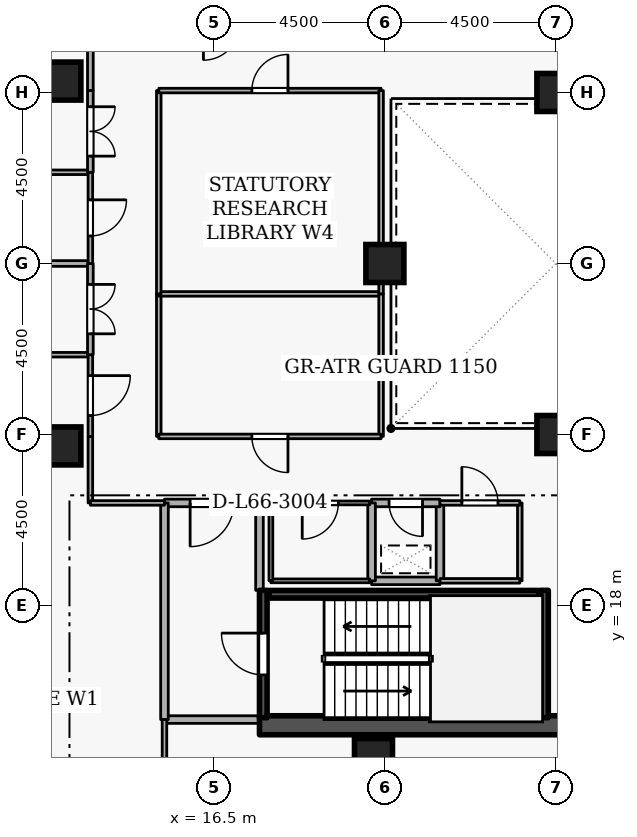
"""IFC4 building model, lengths in metres.
Left out: names, types, materials, properties, quantities, classifications, styles, units other than length and angle.
Written with IfcOpenShell. Run it as: python <this file> out.ifc"""

import sys

from ifc_helpers import new_model, si_unit, direction, frame, frame_2d, origin, origin_2d, place, context, subcontext, project, spatial, rectangle, extrude, element, fill, save


model = new_model("IFC4")
c1 = context("Model", 3, precision=1e-05, world=origin(), true_north=direction((0.0, 1.0)))
c2 = subcontext(c1, "Body", "Model", "MODEL_VIEW")
j1 = project(units=[si_unit("LENGTHUNIT", "METRE"), si_unit("PLANEANGLEUNIT", "RADIAN")], contexts=[c1])
p1 = place(None, origin())
s1 = spatial("IfcSite", under=j1, at=p1, CompositionType="ELEMENT")
p2 = place(p1, origin())
s2 = spatial("IfcBuilding", under=s1, at=p2, CompositionType="ELEMENT")
p3 = place(p2, frame((0.0, 0.0, 247.5)))
s3 = spatial("IfcBuildingStorey", under=s2, at=p3, CompositionType="ELEMENT", Elevation=247.5)
p4 = place(p3, frame((17.7, 14.85, 0.0), z_axis=(0.0, 0.0, 1.0), x_axis=(1.0, 0.0, 0.0)))
e1 = element("IfcWall", 1, at=p4, inside=s3, PredefinedType="SHEAR", context=c2, shape_type="SweptSolid", body=[
    extrude(rectangle(XDim=15.6, YDim=0.5, at=frame_2d((7.8, 0.0))), origin(), (0.0, 0.0, 1.0), 3.6),
])
for number, where, z_axis, x_axis in (
    (2, (12.5, 22.2, 0.0), (0.0, 0.0, 1.0), (1.0, 0.0, 0.0)),
    (3, (12.5, 31.8, 0.0), (0.0, 0.0, 1.0), (1.0, 0.0, 0.0)),
    (4, (20.7, 14.0, 0.0), (0.0, 0.0, 1.0), (1.0, 0.0, 0.0)),
    (5, (25.5, 22.5, 0.0), (0.0, 0.0, 1.0), (1.0, 0.0, 0.0)),
    (6, (25.5, 31.5, 0.0), (0.0, 0.0, 1.0), (1.0, 0.0, 0.0)),
    (7, (21.0, 27.0, 0.0), (0.0, 0.0, 1.0), (1.0, 0.0, 0.0)),
):
    element("IfcColumn", number, at=place(p3, frame(where, z_axis=z_axis, x_axis=x_axis)), inside=s3, PredefinedType="COLUMN", context=c2, shape_type="SweptSolid", body=[
        extrude(rectangle(XDim=1.0, YDim=1.0, at=origin_2d()), origin(), (0.0, 0.0, 1.0), 3.6),
    ])
p5 = place(p3, frame((17.8, 15.05, 0.0), z_axis=(0.0, 0.0, 1.0), x_axis=(0.0, 1.0, 0.0)))
e8 = element("IfcWall", 8, at=p5, inside=s3, PredefinedType="SHEAR", context=c2, shape_type="SweptSolid", body=[
    extrude(rectangle(XDim=3.35, YDim=0.2, at=frame_2d((1.675, 0.0))), origin(), (0.0, 0.0, 1.0), 3.6),
])
p6 = place(p5, frame((1.125, 0.0, 0.0)))
e9 = element("IfcOpeningElement", 9, at=p6, cuts=e8, PredefinedType="OPENING", context=c2, shape_type="SweptSolid", body=[
    extrude(rectangle(XDim=1.1, YDim=2.1, at=frame_2d((0.55, 1.05))), frame((0.0, 0.11, 0.0), z_axis=(0.0, -1.0, 0.0), x_axis=(1.0, 0.0, 0.0)), (0.0, 0.0, 1.0), 0.22),
])
p7 = place(p3, frame((25.2, 18.4, 0.0), z_axis=(0.0, 0.0, 1.0), x_axis=(0.0, -1.0, 0.0)))
e10 = element("IfcWall", 10, at=p7, inside=s3, PredefinedType="SHEAR", context=c2, shape_type="SweptSolid", body=[
    extrude(rectangle(XDim=3.35, YDim=0.2, at=frame_2d((1.675, 0.0))), origin(), (0.0, 0.0, 1.0), 3.6),
])
p8 = place(p3, frame((25.05, 18.297, 0.0), z_axis=(0.0, 0.0, 1.0), x_axis=(-1.0, 0.0, 0.0)))
e11 = element("IfcWall", 11, at=p8, inside=s3, PredefinedType="SHEAR", context=c2, shape_type="SweptSolid", body=[
    extrude(rectangle(XDim=7.1, YDim=0.2, at=frame_2d((3.55, 0.0))), origin(), (0.0, 0.0, 1.0), 3.6),
])
p9 = place(p3, frame((15.2, 15.0, 0.0), z_axis=(0.0, 0.0, 1.0), x_axis=(1.0, 0.0, 0.0)))
e12 = element("IfcWall", 12, at=p9, inside=s3, PredefinedType="STANDARD", context=c2, shape_type="SweptSolid", body=[
    extrude(rectangle(XDim=2.5, YDim=0.2, at=frame_2d((1.25, 0.0))), origin(), (0.0, 0.0, 1.0), 3.34),
])
p10 = place(p3, frame((17.7, 18.4, 0.0), z_axis=(0.0, 0.0, 1.0), x_axis=(0.0, 1.0, 0.0)))
e13 = element("IfcWall", 13, at=p10, inside=s3, PredefinedType="STANDARD", context=c2, shape_type="SweptSolid", body=[
    extrude(rectangle(XDim=2.3, YDim=0.2, at=frame_2d((1.15, 0.0))), origin(), (0.0, 0.0, 1.0), 2.545),
])
p11 = place(p3, frame((17.7, 20.7, 0.0), z_axis=(0.0, 0.0, 1.0), x_axis=(-1.0, 0.0, 0.0)))
e14 = element("IfcWall", 14, at=p11, inside=s3, PredefinedType="STANDARD", context=c2, shape_type="SweptSolid", body=[
    extrude(rectangle(XDim=2.5, YDim=0.2, at=frame_2d((1.25, 0.0))), origin(), (0.0, 0.0, 1.0), 3.34),
])
p12 = place(p11, frame((0.675, 0.0, 0.0)))
e15 = element("IfcOpeningElement", 15, at=p12, cuts=e14, PredefinedType="OPENING", context=c2, shape_type="SweptSolid", body=[
    extrude(rectangle(XDim=1.15, YDim=2.1, at=frame_2d((0.575, 1.05))), frame((0.0, 0.11, 0.0), z_axis=(0.0, -1.0, 0.0), x_axis=(1.0, 0.0, 0.0)), (0.0, 0.0, 1.0), 0.22),
])
p13 = place(p3, frame((15.2, 20.7, 0.0), z_axis=(0.0, 0.0, 1.0), x_axis=(0.0, -1.0, 0.0)))
e16 = element("IfcWall", 16, at=p13, inside=s3, PredefinedType="STANDARD", context=c2, shape_type="SweptSolid", body=[
    extrude(rectangle(XDim=5.7, YDim=0.2, at=frame_2d((2.85, 0.0))), origin(), (0.0, 0.0, 1.0), 3.34),
])
p14 = place(p3, frame((20.65, 18.65, 0.0), z_axis=(0.0, 0.0, 1.0), x_axis=(1.0, 0.0, 0.0)))
e17 = element("IfcWall", 17, at=p14, inside=s3, PredefinedType="STANDARD", context=c2, shape_type="SweptSolid", body=[
    extrude(rectangle(XDim=1.8, YDim=0.2, at=frame_2d((0.9, 0.0))), origin(), (0.0, 0.0, 1.0), 3.34),
])
p15 = place(p3, frame((22.45, 18.65, 0.0), z_axis=(0.0, 0.0, 1.0), x_axis=(0.0, 1.0, 0.0)))
e18 = element("IfcWall", 18, at=p15, inside=s3, PredefinedType="STANDARD", context=c2, shape_type="SweptSolid", body=[
    extrude(rectangle(XDim=2.05, YDim=0.2, at=frame_2d((1.025, 0.0))), origin(), (0.0, 0.0, 1.0), 3.34),
])
p16 = place(p3, frame((22.45, 20.7, 0.0), z_axis=(0.0, 0.0, 1.0), x_axis=(-1.0, 0.0, 0.0)))
e19 = element("IfcWall", 19, at=p16, inside=s3, PredefinedType="STANDARD", context=c2, shape_type="SweptSolid", body=[
    extrude(rectangle(XDim=1.8, YDim=0.2, at=frame_2d((0.9, 0.0))), origin(), (0.0, 0.0, 1.0), 3.34),
])
p17 = place(p16, frame((0.46, 0.0, 0.0)))
e20 = element("IfcOpeningElement", 20, at=p17, cuts=e19, PredefinedType="OPENING", context=c2, shape_type="SweptSolid", body=[
    extrude(rectangle(XDim=0.88, YDim=2.04, at=frame_2d((0.44, 1.02))), frame((0.0, 0.11, 0.0), z_axis=(0.0, -1.0, 0.0), x_axis=(1.0, 0.0, 0.0)), (0.0, 0.0, 1.0), 0.22),
])
p18 = place(p3, frame((20.65, 20.7, 0.0), z_axis=(0.0, 0.0, 1.0), x_axis=(0.0, -1.0, 0.0)))
e21 = element("IfcWall", 21, at=p18, inside=s3, PredefinedType="STANDARD", context=c2, shape_type="SweptSolid", body=[
    extrude(rectangle(XDim=2.05, YDim=0.2, at=frame_2d((1.025, 0.0))), origin(), (0.0, 0.0, 1.0), 3.34),
])
p19 = place(p3, frame((18.0, 18.65, 0.0), z_axis=(0.0, 0.0, 1.0), x_axis=(1.0, 0.0, 0.0)))
e22 = element("IfcWall", 22, at=p19, inside=s3, PredefinedType="PARTITIONING", context=c2, shape_type="SweptSolid", body=[
    extrude(rectangle(XDim=2.6, YDim=0.1, at=frame_2d((1.3, 0.0))), origin(), (0.0, 0.0, 1.0), 3.34),
])
p20 = place(p3, frame((20.6, 20.7, 0.0), z_axis=(0.0, 0.0, 1.0), x_axis=(-1.0, 0.0, 0.0)))
e23 = element("IfcWall", 23, at=p20, inside=s3, PredefinedType="PARTITIONING", context=c2, shape_type="SweptSolid", body=[
    extrude(rectangle(XDim=2.6, YDim=0.1, at=frame_2d((1.3, 0.0))), origin(), (0.0, 0.0, 1.0), 3.34),
])
p21 = place(p20, frame((0.825, 0.0, 0.0)))
e24 = element("IfcOpeningElement", 24, at=p21, cuts=e23, PredefinedType="OPENING", context=c2, shape_type="SweptSolid", body=[
    extrude(rectangle(XDim=0.95, YDim=2.1, at=frame_2d((0.475, 1.05))), frame((0.0, 0.06, 0.0), z_axis=(0.0, -1.0, 0.0), x_axis=(1.0, 0.0, 0.0)), (0.0, 0.0, 1.0), 0.12),
])
p22 = place(p3, frame((18.0, 20.7, 0.0), z_axis=(0.0, 0.0, 1.0), x_axis=(0.0, -1.0, 0.0)))
e25 = element("IfcWall", 25, at=p22, inside=s3, PredefinedType="PARTITIONING", context=c2, shape_type="SweptSolid", body=[
    extrude(rectangle(XDim=2.05, YDim=0.1, at=frame_2d((1.025, 0.0))), origin(), (0.0, 0.0, 1.0), 2.545),
])
p23 = place(p3, frame((24.55, 20.7, 0.0), z_axis=(0.0, 0.0, 1.0), x_axis=(0.0, -1.0, 0.0)))
e26 = element("IfcWall", 26, at=p23, inside=s3, PredefinedType="PARTITIONING", context=c2, shape_type="SweptSolid", body=[
    extrude(rectangle(XDim=2.05, YDim=0.12, at=frame_2d((1.025, 0.0))), origin(), (0.0, 0.0, 1.0), 3.34),
])
p24 = place(p3, frame((24.55, 18.65, 0.0), z_axis=(0.0, 0.0, 1.0), x_axis=(-1.0, 0.0, 0.0)))
e27 = element("IfcWall", 27, at=p24, inside=s3, PredefinedType="PARTITIONING", context=c2, shape_type="SweptSolid", body=[
    extrude(rectangle(XDim=2.1, YDim=0.12, at=frame_2d((1.05, 0.0))), origin(), (0.0, 0.0, 1.0), 3.34),
])
p25 = place(p3, frame((22.45, 20.7, 0.0), z_axis=(0.0, 0.0, 1.0), x_axis=(1.0, 0.0, 0.0)))
e28 = element("IfcWall", 28, at=p25, inside=s3, PredefinedType="PARTITIONING", context=c2, shape_type="SweptSolid", body=[
    extrude(rectangle(XDim=2.1, YDim=0.12, at=frame_2d((1.05, 0.0))), origin(), (0.0, 0.0, 1.0), 3.34),
])
p26 = place(p25, frame((0.575, 0.0, 0.0)))
e29 = element("IfcOpeningElement", 29, at=p26, cuts=e28, PredefinedType="OPENING", context=c2, shape_type="SweptSolid", body=[
    extrude(rectangle(XDim=0.95, YDim=2.1, at=frame_2d((0.475, 1.05))), frame((0.0, 0.07, 0.0), z_axis=(0.0, -1.0, 0.0), x_axis=(1.0, 0.0, 0.0)), (0.0, 0.0, 1.0), 0.14),
])
p27 = place(p3, frame((13.25, 22.45, 0.0), z_axis=(0.0, 0.0, 1.0), x_axis=(0.0, -1.0, 0.0)))
e30 = element("IfcWall", 30, at=p27, inside=s3, PredefinedType="PARTITIONING", context=c2, shape_type="SweptSolid", body=[
    extrude(rectangle(XDim=1.75, YDim=0.12, at=frame_2d((0.875, 0.0))), origin(), (0.0, 0.0, 1.0), 3.34),
])
p28 = place(p3, frame((13.25, 20.7, 0.0), z_axis=(0.0, 0.0, 1.0), x_axis=(1.0, 0.0, 0.0)))
e31 = element("IfcWall", 31, at=p28, inside=s3, PredefinedType="PARTITIONING", context=c2, shape_type="SweptSolid", body=[
    extrude(rectangle(XDim=1.95, YDim=0.12, at=frame_2d((0.975, 0.0))), origin(), (0.0, 0.0, 1.0), 3.34),
])
p29 = place(p3, frame((15.2, 15.0, 0.0), z_axis=(0.0, 0.0, 1.0), x_axis=(0.0, -1.0, 0.0)))
e32 = element("IfcWall", 32, at=p29, inside=s3, PredefinedType="PARTITIONING", context=c2, shape_type="SweptSolid", body=[
    extrude(rectangle(XDim=11.72, YDim=0.12, at=frame_2d((5.86, 0.0))), origin(), (0.0, 0.0, 1.0), 3.34),
])
p30 = place(p3, frame((1.78, 24.6, 0.0), z_axis=(0.0, 0.0, 1.0), x_axis=(1.0, 0.0, 0.0)))
e33 = element("IfcWall", 33, at=p30, inside=s3, PredefinedType="PARTITIONING", context=c2, shape_type="SweptSolid", body=[
    extrude(rectangle(XDim=11.47, YDim=0.12, at=frame_2d((5.735, 0.0))), origin(), (0.0, 0.0, 1.0), 3.34),
])
p31 = place(p3, frame((13.25, 24.6, 0.0), z_axis=(0.0, 0.0, 1.0), x_axis=(0.0, -1.0, 0.0)))
e34 = element("IfcWall", 34, at=p31, inside=s3, PredefinedType="PARTITIONING", context=c2, shape_type="SweptSolid", body=[
    extrude(rectangle(XDim=2.15, YDim=0.12, at=frame_2d((1.075, 0.0))), origin(), (0.0, 0.0, 1.0), 3.34),
])
p32 = place(p31, frame((0.55, 0.0, 0.0)))
e35 = element("IfcOpeningElement", 35, at=p32, cuts=e34, PredefinedType="OPENING", context=c2, shape_type="SweptSolid", body=[
    extrude(rectangle(XDim=1.05, YDim=2.1, at=frame_2d((0.525, 1.05))), frame((0.0, 0.07, 0.0), z_axis=(0.0, -1.0, 0.0), x_axis=(1.0, 0.0, 0.0)), (0.0, 0.0, 1.0), 0.14),
])
p33 = place(p3, frame((1.78, 27.0, 0.0), z_axis=(0.0, 0.0, 1.0), x_axis=(1.0, 0.0, 0.0)))
e36 = element("IfcWall", 36, at=p33, inside=s3, PredefinedType="PARTITIONING", context=c2, shape_type="SweptSolid", body=[
    extrude(rectangle(XDim=11.47, YDim=0.15, at=frame_2d((5.735, 0.0))), origin(), (0.0, 0.0, 1.0), 2.882),
])
p34 = place(p3, frame((13.25, 27.0, 0.0), z_axis=(0.0, 0.0, 1.0), x_axis=(0.0, -1.0, 0.0)))
e37 = element("IfcWall", 37, at=p34, inside=s3, PredefinedType="PARTITIONING", context=c2, shape_type="SweptSolid", body=[
    extrude(rectangle(XDim=2.4, YDim=0.15, at=frame_2d((1.2, 0.0))), origin(), (0.0, 0.0, 1.0), 3.34),
])
p35 = place(p34, frame((0.55, 0.0, 0.0)))
e38 = element("IfcOpeningElement", 38, at=p35, cuts=e37, PredefinedType="OPENING", context=c2, shape_type="SweptSolid", body=[
    extrude(rectangle(XDim=1.3, YDim=2.12, at=frame_2d((0.65, 1.06))), frame((0.0, 0.085, 0.0), z_axis=(0.0, -1.0, 0.0), x_axis=(1.0, 0.0, 0.0)), (0.0, 0.0, 1.0), 0.17),
])
p36 = place(p3, frame((1.78, 29.4, 0.0), z_axis=(0.0, 0.0, 1.0), x_axis=(1.0, 0.0, 0.0)))
e39 = element("IfcWall", 39, at=p36, inside=s3, PredefinedType="PARTITIONING", context=c2, shape_type="SweptSolid", body=[
    extrude(rectangle(XDim=11.47, YDim=0.12, at=frame_2d((5.735, 0.0))), origin(), (0.0, 0.0, 1.0), 3.34),
])
p37 = place(p3, frame((13.25, 29.4, 0.0), z_axis=(0.0, 0.0, 1.0), x_axis=(0.0, -1.0, 0.0)))
e40 = element("IfcWall", 40, at=p37, inside=s3, PredefinedType="PARTITIONING", context=c2, shape_type="SweptSolid", body=[
    extrude(rectangle(XDim=2.4, YDim=0.12, at=frame_2d((1.2, 0.0))), origin(), (0.0, 0.0, 1.0), 3.34),
])
p38 = place(p37, frame((0.725, 0.0, 0.0)))
e41 = element("IfcOpeningElement", 41, at=p38, cuts=e40, PredefinedType="OPENING", context=c2, shape_type="SweptSolid", body=[
    extrude(rectangle(XDim=0.95, YDim=2.1, at=frame_2d((0.475, 1.05))), frame((0.0, 0.07, 0.0), z_axis=(0.0, -1.0, 0.0), x_axis=(1.0, 0.0, 0.0)), (0.0, 0.0, 1.0), 0.14),
])
p39 = place(p3, frame((13.25, 33.3, 0.0), z_axis=(0.0, 0.0, 1.0), x_axis=(0.0, -1.0, 0.0)))
e42 = element("IfcWall", 42, at=p39, inside=s3, PredefinedType="PARTITIONING", context=c2, shape_type="SweptSolid", body=[
    extrude(rectangle(XDim=1.75, YDim=0.15, at=frame_2d((0.875, 0.0))), origin(), (0.0, 0.0, 1.0), 3.34),
])
p40 = place(p3, frame((13.25, 31.55, 0.0), z_axis=(0.0, 0.0, 1.0), x_axis=(0.0, -1.0, 0.0)))
e43 = element("IfcWall", 43, at=p40, inside=s3, PredefinedType="PARTITIONING", context=c2, shape_type="SweptSolid", body=[
    extrude(rectangle(XDim=2.15, YDim=0.15, at=frame_2d((1.075, 0.0))), origin(), (0.0, 0.0, 1.0), 3.34),
])
p41 = place(p40, frame((0.425, 0.0, 0.0)))
e44 = element("IfcOpeningElement", 44, at=p41, cuts=e43, PredefinedType="OPENING", context=c2, shape_type="SweptSolid", body=[
    extrude(rectangle(XDim=1.3, YDim=2.12, at=frame_2d((0.65, 1.06))), frame((0.0, 0.085, 0.0), z_axis=(0.0, -1.0, 0.0), x_axis=(1.0, 0.0, 0.0)), (0.0, 0.0, 1.0), 0.17),
])
p42 = place(p3, frame((15.05, 22.45, 0.0), z_axis=(0.0, 0.0, 1.0), x_axis=(0.0, 1.0, 0.0)))
e45 = element("IfcWall", 45, at=p42, inside=s3, PredefinedType="PARTITIONING", context=c2, shape_type="SweptSolid", body=[
    extrude(rectangle(XDim=3.75, YDim=0.12, at=frame_2d((1.875, 0.0))), origin(), (0.0, 0.0, 1.0), 3.34),
])
p43 = place(p3, frame((15.05, 26.2, 0.0), z_axis=(0.0, 0.0, 1.0), x_axis=(1.0, 0.0, 0.0)))
e46 = element("IfcWall", 46, at=p43, inside=s3, PredefinedType="PARTITIONING", context=c2, shape_type="SweptSolid", body=[
    extrude(rectangle(XDim=5.85, YDim=0.12, at=frame_2d((2.925, 0.0))), origin(), (0.0, 0.0, 1.0), 3.34),
])
p44 = place(p3, frame((20.9, 26.2, 0.0), z_axis=(0.0, 0.0, 1.0), x_axis=(0.0, -1.0, 0.0)))
e47 = element("IfcWall", 47, at=p44, inside=s3, PredefinedType="PARTITIONING", context=c2, shape_type="SweptSolid", body=[
    extrude(rectangle(XDim=3.75, YDim=0.12, at=frame_2d((1.875, 0.0))), origin(), (0.0, 0.0, 1.0), 3.34),
])
p45 = place(p3, frame((20.9, 22.45, 0.0), z_axis=(0.0, 0.0, 1.0), x_axis=(-1.0, 0.0, 0.0)))
e48 = element("IfcWall", 48, at=p45, inside=s3, PredefinedType="PARTITIONING", context=c2, shape_type="SweptSolid", body=[
    extrude(rectangle(XDim=5.85, YDim=0.12, at=frame_2d((2.925, 0.0))), origin(), (0.0, 0.0, 1.0), 3.34),
])
p46 = place(p45, frame((2.45, 0.0, 0.0)))
e49 = element("IfcOpeningElement", 49, at=p46, cuts=e48, PredefinedType="OPENING", context=c2, shape_type="SweptSolid", body=[
    extrude(rectangle(XDim=0.95, YDim=2.1, at=frame_2d((0.475, 1.05))), frame((0.0, 0.07, 0.0), z_axis=(0.0, -1.0, 0.0), x_axis=(1.0, 0.0, 0.0)), (0.0, 0.0, 1.0), 0.14),
])
p47 = place(p3, frame((15.05, 26.2, 0.0), z_axis=(0.0, 0.0, 1.0), x_axis=(0.0, 1.0, 0.0)))
e50 = element("IfcWall", 50, at=p47, inside=s3, PredefinedType="PARTITIONING", context=c2, shape_type="SweptSolid", body=[
    extrude(rectangle(XDim=5.35, YDim=0.12, at=frame_2d((2.675, 0.0))), origin(), (0.0, 0.0, 1.0), 3.34),
])
p48 = place(p3, frame((15.05, 31.55, 0.0), z_axis=(0.0, 0.0, 1.0), x_axis=(1.0, 0.0, 0.0)))
e51 = element("IfcWall", 51, at=p48, inside=s3, PredefinedType="PARTITIONING", context=c2, shape_type="SweptSolid", body=[
    extrude(rectangle(XDim=5.85, YDim=0.12, at=frame_2d((2.925, 0.0))), origin(), (0.0, 0.0, 1.0), 3.34),
])
p49 = place(p48, frame((2.45, 0.0, 0.0)))
e52 = element("IfcOpeningElement", 52, at=p49, cuts=e51, PredefinedType="OPENING", context=c2, shape_type="SweptSolid", body=[
    extrude(rectangle(XDim=0.95, YDim=2.1, at=frame_2d((0.475, 1.05))), frame((0.0, 0.07, 0.0), z_axis=(0.0, -1.0, 0.0), x_axis=(1.0, 0.0, 0.0)), (0.0, 0.0, 1.0), 0.14),
])
p50 = place(p3, frame((20.9, 31.55, 0.0), z_axis=(0.0, 0.0, 1.0), x_axis=(0.0, -1.0, 0.0)))
e53 = element("IfcWall", 53, at=p50, inside=s3, PredefinedType="PARTITIONING", context=c2, shape_type="SweptSolid", body=[
    extrude(rectangle(XDim=5.35, YDim=0.12, at=frame_2d((2.675, 0.0))), origin(), (0.0, 0.0, 1.0), 3.34),
])
p51 = place(p6, origin())
e54 = element("IfcDoor", 54, at=p51, inside=s3, OperationType="SINGLE_SWING_RIGHT", PredefinedType="DOOR", context=c2, shape_type="SweptSolid", body=[
    extrude(rectangle(XDim=1.1, YDim=2.1, at=frame_2d((0.55, 1.05))), frame((0.0, 0.025, 0.0), z_axis=(0.0, -1.0, 0.0), x_axis=(1.0, 0.0, 0.0)), (0.0, 0.0, 1.0), 0.05),
])
fill(e9, e54)
p52 = place(p12, origin())
e55 = element("IfcDoor", 55, at=p52, inside=s3, OperationType="SINGLE_SWING_RIGHT", PredefinedType="DOOR", context=c2, shape_type="SweptSolid", body=[
    extrude(rectangle(XDim=1.15, YDim=2.1, at=frame_2d((0.575, 1.05))), frame((0.0, 0.025, 0.0), z_axis=(0.0, -1.0, 0.0), x_axis=(1.0, 0.0, 0.0)), (0.0, 0.0, 1.0), 0.05),
])
fill(e15, e55)
p53 = place(p17, origin())
e56 = element("IfcDoor", 56, at=p53, inside=s3, OperationType="SINGLE_SWING_LEFT", PredefinedType="DOOR", context=c2, shape_type="SweptSolid", body=[
    extrude(rectangle(XDim=0.88, YDim=2.04, at=frame_2d((0.44, 1.02))), frame((0.0, 0.025, 0.0), z_axis=(0.0, -1.0, 0.0), x_axis=(1.0, 0.0, 0.0)), (0.0, 0.0, 1.0), 0.05),
])
fill(e20, e56)
p54 = place(p21, origin())
e57 = element("IfcDoor", 57, at=p54, inside=s3, OperationType="SINGLE_SWING_RIGHT", PredefinedType="DOOR", context=c2, shape_type="SweptSolid", body=[
    extrude(rectangle(XDim=0.95, YDim=2.1, at=frame_2d((0.475, 1.05))), frame((0.0, 0.025, 0.0), z_axis=(0.0, -1.0, 0.0), x_axis=(1.0, 0.0, 0.0)), (0.0, 0.0, 1.0), 0.05),
])
fill(e24, e57)
p55 = place(p26, origin())
e58 = element("IfcDoor", 58, at=p55, inside=s3, OperationType="SINGLE_SWING_LEFT", PredefinedType="DOOR", context=c2, shape_type="SweptSolid", body=[
    extrude(rectangle(XDim=0.95, YDim=2.1, at=frame_2d((0.475, 1.05))), frame((0.0, 0.025, 0.0), z_axis=(0.0, -1.0, 0.0), x_axis=(1.0, 0.0, 0.0)), (0.0, 0.0, 1.0), 0.05),
])
fill(e29, e58)
p56 = place(p32, origin())
e59 = element("IfcDoor", 59, at=p56, inside=s3, OperationType="SINGLE_SWING_LEFT", PredefinedType="DOOR", context=c2, shape_type="SweptSolid", body=[
    extrude(rectangle(XDim=1.05, YDim=2.1, at=frame_2d((0.525, 1.05))), frame((0.0, 0.025, 0.0), z_axis=(0.0, -1.0, 0.0), x_axis=(1.0, 0.0, 0.0)), (0.0, 0.0, 1.0), 0.05),
])
fill(e35, e59)
p57 = place(p35, origin())
e60 = element("IfcDoor", 60, at=p57, inside=s3, OperationType="DOUBLE_DOOR_SINGLE_SWING", PredefinedType="DOOR", context=c2, shape_type="SweptSolid", body=[
    extrude(rectangle(XDim=1.3, YDim=2.12, at=frame_2d((0.65, 1.06))), frame((0.0, 0.025, 0.0), z_axis=(0.0, -1.0, 0.0), x_axis=(1.0, 0.0, 0.0)), (0.0, 0.0, 1.0), 0.05),
])
fill(e38, e60)
p58 = place(p38, origin())
e61 = element("IfcDoor", 61, at=p58, inside=s3, OperationType="SINGLE_SWING_LEFT", PredefinedType="DOOR", context=c2, shape_type="SweptSolid", body=[
    extrude(rectangle(XDim=0.95, YDim=2.1, at=frame_2d((0.475, 1.05))), frame((0.0, 0.025, 0.0), z_axis=(0.0, -1.0, 0.0), x_axis=(1.0, 0.0, 0.0)), (0.0, 0.0, 1.0), 0.05),
])
fill(e41, e61)
p59 = place(p41, origin())
e62 = element("IfcDoor", 62, at=p59, inside=s3, OperationType="DOUBLE_DOOR_SINGLE_SWING", PredefinedType="DOOR", context=c2, shape_type="SweptSolid", body=[
    extrude(rectangle(XDim=1.3, YDim=2.12, at=frame_2d((0.65, 1.06))), frame((0.0, 0.025, 0.0), z_axis=(0.0, -1.0, 0.0), x_axis=(1.0, 0.0, 0.0)), (0.0, 0.0, 1.0), 0.05),
])
fill(e44, e62)
p60 = place(p46, origin())
e63 = element("IfcDoor", 63, at=p60, inside=s3, OperationType="SINGLE_SWING_LEFT", PredefinedType="DOOR", context=c2, shape_type="SweptSolid", body=[
    extrude(rectangle(XDim=0.95, YDim=2.1, at=frame_2d((0.475, 1.05))), frame((0.0, 0.025, 0.0), z_axis=(0.0, -1.0, 0.0), x_axis=(1.0, 0.0, 0.0)), (0.0, 0.0, 1.0), 0.05),
])
fill(e49, e63)
p61 = place(p49, origin())
e64 = element("IfcDoor", 64, at=p61, inside=s3, OperationType="SINGLE_SWING_RIGHT", PredefinedType="DOOR", context=c2, shape_type="SweptSolid", body=[
    extrude(rectangle(XDim=0.95, YDim=2.1, at=frame_2d((0.475, 1.05))), frame((0.0, 0.025, 0.0), z_axis=(0.0, -1.0, 0.0), x_axis=(1.0, 0.0, 0.0)), (0.0, 0.0, 1.0), 0.05),
])
fill(e52, e64)
save(model, sys.argv[1])
